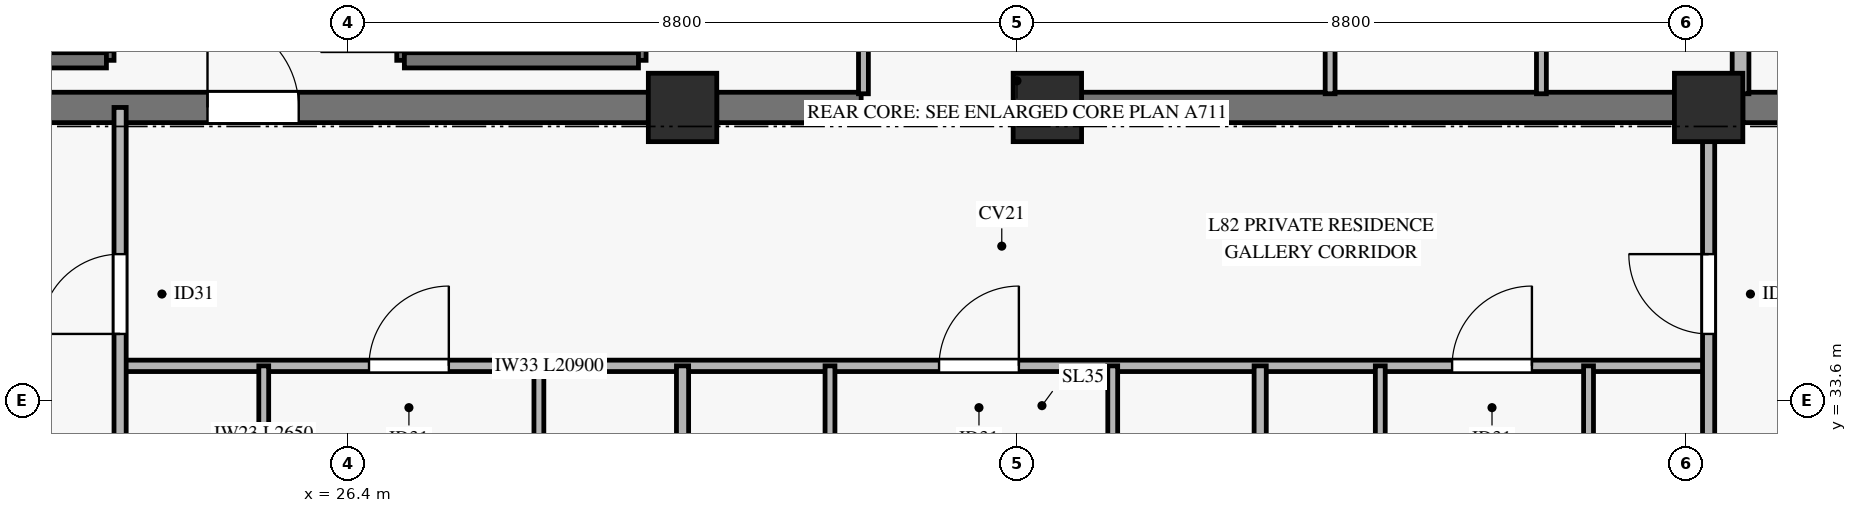
"""IFC4 building model, lengths in metres.
Left out: names, types, materials, properties, quantities, classifications, styles, units other than length and angle.
Written with IfcOpenShell. Run it as: python <this file> out.ifc"""

import sys

from ifc_helpers import new_model, si_unit, direction, frame, frame_2d, origin, origin_2d, place, context, subcontext, project, spatial, rectangle, extrude, source, transform, mapped, element, fill, save


model = new_model("IFC4")
c1 = context("Model", 3, precision=1e-05, world=origin(), true_north=direction((0.0, 1.0)))
c2 = subcontext(c1, "Body", "Model", "MODEL_VIEW")
j1 = project(units=[si_unit("LENGTHUNIT", "METRE"), si_unit("PLANEANGLEUNIT", "RADIAN")], contexts=[c1])
p1 = place(None, origin())
s1 = spatial("IfcSite", under=j1, at=p1, CompositionType="ELEMENT")
p2 = place(p1, origin())
s2 = spatial("IfcBuilding", under=s1, at=p2, CompositionType="ELEMENT")
p3 = place(p2, frame((0.0, 0.0, 317.6)))
s3 = spatial("IfcBuildingStorey", under=s2, at=p3, CompositionType="ELEMENT", Elevation=317.6)
m1 = source(origin(), c2, "Body", "SweptSolid", [
    extrude(rectangle(XDim=0.9, YDim=0.9, at=origin_2d()), origin(), (0.0, 0.0, 1.0), 3.185),
])
for number, where, z_axis, x_axis in (
    (1, (30.8, 37.45, 0.0), (0.0, 0.0, 1.0), (1.0, 0.0, 0.0)),
    (2, (35.6, 37.45, 0.0), (0.0, 0.0, 1.0), (1.0, 0.0, 0.0)),
    (3, (44.3, 37.45, 0.0), (0.0, 0.0, 1.0), (1.0, 0.0, 0.0)),
):
    element("IfcColumn", number, at=place(p3, frame(where, z_axis=z_axis, x_axis=x_axis)), inside=s3, PredefinedType="PILASTER", context=c2, shape_type="MappedRepresentation", body=[
        mapped(m1, transform((0.0, 0.0, 0.0), x_axis=(1.0, 0.0, 0.0), y_axis=(0.0, 1.0, 0.0), z_axis=(0.0, 0.0, 1.0), scale=1.0)),
    ])
p4 = place(p3, frame((20.3, 37.45, 0.0), z_axis=(0.0, 0.0, 1.0), x_axis=(1.0, 0.0, 0.0)))
e4 = element("IfcWall", 4, at=p4, inside=s3, PredefinedType="SHEAR", context=c2, shape_type="SweptSolid", body=[
    extrude(rectangle(XDim=10.05, YDim=0.4, at=frame_2d((5.025, 0.0))), origin(), (0.0, 0.0, 1.0), 3.185),
])
p5 = place(p4, frame((4.25, 0.0, 0.0)))
e5 = element("IfcOpeningElement", 5, at=p5, cuts=e4, PredefinedType="OPENING", context=c2, shape_type="SweptSolid", body=[
    extrude(rectangle(XDim=1.2, YDim=2.15, at=frame_2d((0.6, 1.075))), frame((0.0, 0.21, 0.0), z_axis=(0.0, -1.0, 0.0), x_axis=(1.0, 0.0, 0.0)), (0.0, 0.0, 1.0), 0.42),
])
p6 = place(p3, frame((31.25, 37.45, 0.0), z_axis=(0.0, 0.0, 1.0), x_axis=(1.0, 0.0, 0.0)))
e6 = element("IfcWall", 6, at=p6, inside=s3, PredefinedType="SHEAR", context=c2, shape_type="SweptSolid", body=[
    extrude(rectangle(XDim=1.9, YDim=0.4, at=frame_2d((0.95, 0.0))), origin(), (0.0, 0.0, 1.0), 3.185),
])
p7 = place(p3, frame((36.05, 37.45, 0.0), z_axis=(0.0, 0.0, 1.0), x_axis=(1.0, 0.0, 0.0)))
e7 = element("IfcWall", 7, at=p7, inside=s3, PredefinedType="SHEAR", context=c2, shape_type="SweptSolid", body=[
    extrude(rectangle(XDim=7.8, YDim=0.4, at=frame_2d((3.9, 0.0))), origin(), (0.0, 0.0, 1.0), 3.185),
])
p8 = place(p3, frame((44.75, 37.45, 0.0), z_axis=(0.0, 0.0, 1.0), x_axis=(1.0, 0.0, 0.0)))
e8 = element("IfcWall", 8, at=p8, inside=s3, PredefinedType="SHEAR", context=c2, shape_type="SweptSolid", body=[
    extrude(rectangle(XDim=5.35, YDim=0.4, at=frame_2d((2.675, 0.0))), origin(), (0.0, 0.0, 1.0), 3.185),
])
p9 = place(p8, frame((0.7, 0.0, 0.0)))
e9 = element("IfcOpeningElement", 9, at=p9, cuts=e8, PredefinedType="OPENING", context=c2, shape_type="SweptSolid", body=[
    extrude(rectangle(XDim=1.2, YDim=2.15, at=frame_2d((0.6, 1.075))), frame((0.0, 0.21, 0.0), z_axis=(0.0, -1.0, 0.0), x_axis=(1.0, 0.0, 0.0)), (0.0, 0.0, 1.0), 0.42),
])
p10 = place(p3, frame((23.22, 38.07, 0.0), z_axis=(0.0, 0.0, 1.0), x_axis=(0.0, 1.0, 0.0)))
e10 = element("IfcWall", 10, at=p10, inside=s3, PredefinedType="SOLIDWALL", context=c2, shape_type="SweptSolid", body=[
    extrude(rectangle(XDim=7.25, YDim=0.2, at=frame_2d((3.625, 0.0))), origin(), (0.0, 0.0, 1.0), 3.4),
])
p11 = place(p10, frame((0.11, 0.0, 0.0)))
e11 = element("IfcOpeningElement", 11, at=p11, cuts=e10, PredefinedType="OPENING", context=c2, shape_type="SweptSolid", body=[
    extrude(rectangle(XDim=1.1, YDim=2.15, at=frame_2d((0.55, 1.075))), frame((0.0, 0.11, 0.0), z_axis=(0.0, -1.0, 0.0), x_axis=(1.0, 0.0, 0.0)), (0.0, 0.0, 1.0), 0.22),
])
p12 = place(p3, frame((20.17, 38.07, 0.0), z_axis=(0.0, 0.0, 1.0), x_axis=(1.0, 0.0, 0.0)))
e12 = element("IfcWall", 12, at=p12, inside=s3, PredefinedType="SOLIDWALL", context=c2, shape_type="SweptSolid", body=[
    extrude(rectangle(XDim=3.05, YDim=0.2, at=frame_2d((1.525, 0.0))), origin(), (0.0, 0.0, 1.0), 3.4),
])
p13 = place(p3, frame((27.14, 38.07, 0.0), z_axis=(0.0, 0.0, 1.0), x_axis=(0.0, 1.0, 0.0)))
e13 = element("IfcWall", 13, at=p13, inside=s3, PredefinedType="SOLIDWALL", context=c2, shape_type="SweptSolid", body=[
    extrude(rectangle(XDim=7.25, YDim=0.2, at=frame_2d((3.625, 0.0))), origin(), (0.0, 0.0, 1.0), 3.4),
])
p14 = place(p13, frame((0.11, 0.0, 0.0)))
e14 = element("IfcOpeningElement", 14, at=p14, cuts=e13, PredefinedType="OPENING", context=c2, shape_type="SweptSolid", body=[
    extrude(rectangle(XDim=1.1, YDim=2.15, at=frame_2d((0.55, 1.075))), frame((0.0, 0.11, 0.0), z_axis=(0.0, -1.0, 0.0), x_axis=(1.0, 0.0, 0.0)), (0.0, 0.0, 1.0), 0.22),
])
p15 = place(p3, frame((30.22, 38.07, 0.0), z_axis=(0.0, 0.0, 1.0), x_axis=(0.0, 1.0, 0.0)))
e15 = element("IfcWall", 15, at=p15, inside=s3, PredefinedType="SOLIDWALL", context=c2, shape_type="SweptSolid", body=[
    extrude(rectangle(XDim=7.25, YDim=0.2, at=frame_2d((3.625, 0.0))), origin(), (0.0, 0.0, 1.0), 3.4),
])
p16 = place(p3, frame((27.14, 38.07, 0.0), z_axis=(0.0, 0.0, 1.0), x_axis=(1.0, 0.0, 0.0)))
e16 = element("IfcWall", 16, at=p16, inside=s3, PredefinedType="SOLIDWALL", context=c2, shape_type="SweptSolid", body=[
    extrude(rectangle(XDim=3.08, YDim=0.2, at=frame_2d((1.54, 0.0))), origin(), (0.0, 0.0, 1.0), 3.4),
])
p17 = place(p3, frame((44.72, 37.63, 0.0), z_axis=(0.0, 0.0, 1.0), x_axis=(0.0, 1.0, 0.0)))
e17 = element("IfcWall", 17, at=p17, inside=s3, PredefinedType="SOLIDWALL", context=c2, shape_type="SweptSolid", body=[
    extrude(rectangle(XDim=7.59, YDim=0.22, at=frame_2d((3.795, 0.0))), origin(), (0.0, 0.0, 1.0), 3.185),
])
p18 = place(p3, frame((33.18, 37.63, 0.0), z_axis=(0.0, 0.0, 1.0), x_axis=(0.0, 1.0, 0.0)))
e18 = element("IfcWall", 18, at=p18, inside=s3, PredefinedType="PARTITIONING", context=c2, shape_type="SweptSolid", body=[
    extrude(rectangle(XDim=6.52, YDim=0.13, at=frame_2d((3.26, 0.0))), origin(), (0.0, 0.0, 1.0), 2.27),
])
p19 = place(p18, frame((0.97, 0.0, 0.0)))
e19 = element("IfcOpeningElement", 19, at=p19, cuts=e18, PredefinedType="OPENING", context=c2, shape_type="SweptSolid", body=[
    extrude(rectangle(XDim=0.9, YDim=2.1, at=frame_2d((0.45, 1.05))), frame((0.0, 0.075, 0.0), z_axis=(0.0, -1.0, 0.0), x_axis=(1.0, 0.0, 0.0)), (0.0, 0.0, 1.0), 0.15),
])
p20 = place(p18, frame((3.87, 0.0, 0.0)))
e20 = element("IfcOpeningElement", 20, at=p20, cuts=e18, PredefinedType="OPENING", context=c2, shape_type="SweptSolid", body=[
    extrude(rectangle(XDim=0.9, YDim=2.1, at=frame_2d((0.45, 1.05))), frame((0.0, 0.075, 0.0), z_axis=(0.0, -1.0, 0.0), x_axis=(1.0, 0.0, 0.0)), (0.0, 0.0, 1.0), 0.15),
])
p21 = place(p3, frame((39.32, 37.63, 0.0), z_axis=(0.0, 0.0, 1.0), x_axis=(0.0, 1.0, 0.0)))
e21 = element("IfcWall", 21, at=p21, inside=s3, PredefinedType="PARTITIONING", context=c2, shape_type="SweptSolid", body=[
    extrude(rectangle(XDim=8.74, YDim=0.13, at=frame_2d((4.37, 0.0))), origin(), (0.0, 0.0, 1.0), 3.185),
])
p22 = place(p21, frame((4.89, 0.0, 0.0)))
e22 = element("IfcOpeningElement", 22, at=p22, cuts=e21, PredefinedType="OPENING", context=c2, shape_type="SweptSolid", body=[
    extrude(rectangle(XDim=0.9, YDim=2.1, at=frame_2d((0.45, 1.05))), frame((0.0, 0.075, 0.0), z_axis=(0.0, -1.0, 0.0), x_axis=(1.0, 0.0, 0.0)), (0.0, 0.0, 1.0), 0.15),
])
p23 = place(p3, frame((42.1, 37.63, 0.0), z_axis=(0.0, 0.0, 1.0), x_axis=(0.0, 1.0, 0.0)))
e23 = element("IfcWall", 23, at=p23, inside=s3, PredefinedType="PARTITIONING", context=c2, shape_type="SweptSolid", body=[
    extrude(rectangle(XDim=8.74, YDim=0.13, at=frame_2d((4.37, 0.0))), origin(), (0.0, 0.0, 1.0), 3.185),
])
p24 = place(p23, frame((2.17, 0.0, 0.0)))
e24 = element("IfcOpeningElement", 24, at=p24, cuts=e23, PredefinedType="OPENING", context=c2, shape_type="SweptSolid", body=[
    extrude(rectangle(XDim=0.9, YDim=2.1, at=frame_2d((0.45, 1.05))), frame((0.0, 0.075, 0.0), z_axis=(0.0, -1.0, 0.0), x_axis=(1.0, 0.0, 0.0)), (0.0, 0.0, 1.0), 0.15),
])
p25 = place(p3, frame((23.4, 34.05, 0.0), z_axis=(0.0, 0.0, 1.0), x_axis=(1.0, 0.0, 0.0)))
e25 = element("IfcWall", 25, at=p25, inside=s3, PredefinedType="PARTITIONING", context=c2, shape_type="SweptSolid", body=[
    extrude(rectangle(XDim=20.9, YDim=0.15, at=frame_2d((10.45, 0.0))), origin(), (0.0, 0.0, 1.0), 2.47),
])
p26 = place(p25, frame((3.275, 0.0, 0.0)))
e26 = element("IfcOpeningElement", 26, at=p26, cuts=e25, PredefinedType="OPENING", context=c2, shape_type="SweptSolid", body=[
    extrude(rectangle(XDim=1.05, YDim=2.15, at=frame_2d((0.525, 1.075))), frame((0.0, 0.085, 0.0), z_axis=(0.0, -1.0, 0.0), x_axis=(1.0, 0.0, 0.0)), (0.0, 0.0, 1.0), 0.17),
])
p27 = place(p25, frame((10.775, 0.0, 0.0)))
e27 = element("IfcOpeningElement", 27, at=p27, cuts=e25, PredefinedType="OPENING", context=c2, shape_type="SweptSolid", body=[
    extrude(rectangle(XDim=1.05, YDim=2.15, at=frame_2d((0.525, 1.075))), frame((0.0, 0.085, 0.0), z_axis=(0.0, -1.0, 0.0), x_axis=(1.0, 0.0, 0.0)), (0.0, 0.0, 1.0), 0.17),
])
p28 = place(p25, frame((17.525, 0.0, 0.0)))
e28 = element("IfcOpeningElement", 28, at=p28, cuts=e25, PredefinedType="OPENING", context=c2, shape_type="SweptSolid", body=[
    extrude(rectangle(XDim=1.05, YDim=2.15, at=frame_2d((0.525, 1.075))), frame((0.0, 0.085, 0.0), z_axis=(0.0, -1.0, 0.0), x_axis=(1.0, 0.0, 0.0)), (0.0, 0.0, 1.0), 0.17),
])
p29 = place(p3, frame((23.4, 20.704, 0.0), z_axis=(0.0, 0.0, 1.0), x_axis=(0.0, 1.0, 0.0)))
e29 = element("IfcWall", 29, at=p29, inside=s3, PredefinedType="PARTITIONING", context=c2, shape_type="SweptSolid", body=[
    extrude(rectangle(XDim=16.746, YDim=0.16, at=frame_2d((8.373, 0.0))), origin(), (0.0, 0.0, 1.0), 2.77),
])
p30 = place(p29, frame((13.766, 0.0, 0.0)))
e30 = element("IfcOpeningElement", 30, at=p30, cuts=e29, PredefinedType="OPENING", context=c2, shape_type="SweptSolid", body=[
    extrude(rectangle(XDim=1.05, YDim=2.15, at=frame_2d((0.525, 1.075))), frame((0.0, 0.09, 0.0), z_axis=(0.0, -1.0, 0.0), x_axis=(1.0, 0.0, 0.0)), (0.0, 0.0, 1.0), 0.18),
])
p31 = place(p3, frame((30.8, 20.704, 0.0), z_axis=(0.0, 0.0, 1.0), x_axis=(0.0, 1.0, 0.0)))
e31 = element("IfcWall", 31, at=p31, inside=s3, PredefinedType="PARTITIONING", context=c2, shape_type="SweptSolid", body=[
    extrude(rectangle(XDim=13.346, YDim=0.16, at=frame_2d((6.673, 0.0))), origin(), (0.0, 0.0, 1.0), 2.47),
])
p32 = place(p3, frame((38.4, 20.704, 0.0), z_axis=(0.0, 0.0, 1.0), x_axis=(0.0, 1.0, 0.0)))
e32 = element("IfcWall", 32, at=p32, inside=s3, PredefinedType="PARTITIONING", context=c2, shape_type="SweptSolid", body=[
    extrude(rectangle(XDim=13.346, YDim=0.16, at=frame_2d((6.673, 0.0))), origin(), (0.0, 0.0, 1.0), 2.77),
])
p33 = place(p3, frame((44.3, 20.704, 0.0), z_axis=(0.0, 0.0, 1.0), x_axis=(0.0, 1.0, 0.0)))
e33 = element("IfcWall", 33, at=p33, inside=s3, PredefinedType="PARTITIONING", context=c2, shape_type="SweptSolid", body=[
    extrude(rectangle(XDim=16.746, YDim=0.16, at=frame_2d((8.373, 0.0))), origin(), (0.0, 0.0, 1.0), 2.47),
])
p34 = place(p33, frame((13.766, 0.0, 0.0)))
e34 = element("IfcOpeningElement", 34, at=p34, cuts=e33, PredefinedType="OPENING", context=c2, shape_type="SweptSolid", body=[
    extrude(rectangle(XDim=1.05, YDim=2.15, at=frame_2d((0.525, 1.075))), frame((0.0, 0.09, 0.0), z_axis=(0.0, -1.0, 0.0), x_axis=(1.0, 0.0, 0.0)), (0.0, 0.0, 1.0), 0.18),
])
p35 = place(p3, frame((25.29, 31.4, 0.0), z_axis=(0.0, 0.0, 1.0), x_axis=(0.0, 1.0, 0.0)))
e35 = element("IfcWall", 35, at=p35, inside=s3, PredefinedType="PARTITIONING", context=c2, shape_type="SweptSolid", body=[
    extrude(rectangle(XDim=2.65, YDim=0.13, at=frame_2d((1.325, 0.0))), origin(), (0.0, 0.0, 1.0), 2.77),
])
p36 = place(p3, frame((28.91, 31.4, 0.0), z_axis=(0.0, 0.0, 1.0), x_axis=(0.0, 1.0, 0.0)))
e36 = element("IfcWall", 36, at=p36, inside=s3, PredefinedType="PARTITIONING", context=c2, shape_type="SweptSolid", body=[
    extrude(rectangle(XDim=2.65, YDim=0.13, at=frame_2d((1.325, 0.0))), origin(), (0.0, 0.0, 1.0), 2.77),
])
p37 = place(p36, frame((0.67, 0.0, 0.0)))
e37 = element("IfcOpeningElement", 37, at=p37, cuts=e36, PredefinedType="OPENING", context=c2, shape_type="SweptSolid", body=[
    extrude(rectangle(XDim=0.9, YDim=2.1, at=frame_2d((0.45, 1.05))), frame((0.0, 0.075, 0.0), z_axis=(0.0, -1.0, 0.0), x_axis=(1.0, 0.0, 0.0)), (0.0, 0.0, 1.0), 0.15),
])
p38 = place(p3, frame((32.74, 31.4, 0.0), z_axis=(0.0, 0.0, 1.0), x_axis=(0.0, 1.0, 0.0)))
e38 = element("IfcWall", 38, at=p38, inside=s3, PredefinedType="PARTITIONING", context=c2, shape_type="SweptSolid", body=[
    extrude(rectangle(XDim=2.65, YDim=0.13, at=frame_2d((1.325, 0.0))), origin(), (0.0, 0.0, 1.0), 2.77),
])
p39 = place(p3, frame((36.46, 31.4, 0.0), z_axis=(0.0, 0.0, 1.0), x_axis=(0.0, 1.0, 0.0)))
e39 = element("IfcWall", 39, at=p39, inside=s3, PredefinedType="PARTITIONING", context=c2, shape_type="SweptSolid", body=[
    extrude(rectangle(XDim=2.65, YDim=0.13, at=frame_2d((1.325, 0.0))), origin(), (0.0, 0.0, 1.0), 2.77),
])
p40 = place(p39, frame((0.67, 0.0, 0.0)))
e40 = element("IfcOpeningElement", 40, at=p40, cuts=e39, PredefinedType="OPENING", context=c2, shape_type="SweptSolid", body=[
    extrude(rectangle(XDim=0.9, YDim=2.1, at=frame_2d((0.45, 1.05))), frame((0.0, 0.075, 0.0), z_axis=(0.0, -1.0, 0.0), x_axis=(1.0, 0.0, 0.0)), (0.0, 0.0, 1.0), 0.15),
])
p41 = place(p3, frame((39.98, 31.4, 0.0), z_axis=(0.0, 0.0, 1.0), x_axis=(0.0, 1.0, 0.0)))
e41 = element("IfcWall", 41, at=p41, inside=s3, PredefinedType="PARTITIONING", context=c2, shape_type="SweptSolid", body=[
    extrude(rectangle(XDim=2.65, YDim=0.13, at=frame_2d((1.325, 0.0))), origin(), (0.0, 0.0, 1.0), 2.77),
])
p42 = place(p3, frame((42.72, 31.4, 0.0), z_axis=(0.0, 0.0, 1.0), x_axis=(0.0, 1.0, 0.0)))
e42 = element("IfcWall", 42, at=p42, inside=s3, PredefinedType="PARTITIONING", context=c2, shape_type="SweptSolid", body=[
    extrude(rectangle(XDim=2.65, YDim=0.13, at=frame_2d((1.325, 0.0))), origin(), (0.0, 0.0, 1.0), 2.77),
])
p43 = place(p42, frame((0.67, 0.0, 0.0)))
e43 = element("IfcOpeningElement", 43, at=p43, cuts=e42, PredefinedType="OPENING", context=c2, shape_type="SweptSolid", body=[
    extrude(rectangle(XDim=0.9, YDim=2.1, at=frame_2d((0.45, 1.05))), frame((0.0, 0.075, 0.0), z_axis=(0.0, -1.0, 0.0), x_axis=(1.0, 0.0, 0.0)), (0.0, 0.0, 1.0), 0.15),
])
m2 = source(origin(), c2, "Body", "SweptSolid", [
    extrude(rectangle(XDim=1.2, YDim=2.15, at=frame_2d((0.6, 1.075))), frame((0.0, 0.025, 0.0), z_axis=(0.0, -1.0, 0.0), x_axis=(1.0, 0.0, 0.0)), (0.0, 0.0, 1.0), 0.05),
])
p44 = place(p5, origin())
e44 = element("IfcDoor", 44, at=p44, inside=s3, OperationType="SINGLE_SWING_LEFT", PredefinedType="DOOR", context=c2, shape_type="MappedRepresentation", body=[
    mapped(m2, transform((0.0, 0.0, 0.0), x_axis=(1.0, 0.0, 0.0), y_axis=(0.0, 1.0, 0.0), z_axis=(0.0, 0.0, 1.0), scale=1.0)),
])
fill(e5, e44)
m3 = source(origin(), c2, "Body", "SweptSolid", [
    extrude(rectangle(XDim=1.05, YDim=2.15, at=frame_2d((0.525, 1.075))), frame((0.0, 0.025, 0.0), z_axis=(0.0, -1.0, 0.0), x_axis=(1.0, 0.0, 0.0)), (0.0, 0.0, 1.0), 0.05),
])
p45 = place(p30, origin())
e45 = element("IfcDoor", 45, at=p45, inside=s3, OperationType="SINGLE_SWING_LEFT", PredefinedType="DOOR", context=c2, shape_type="MappedRepresentation", body=[
    mapped(m3, transform((0.0, 0.0, 0.0), x_axis=(1.0, 0.0, 0.0), y_axis=(0.0, 1.0, 0.0), z_axis=(0.0, 0.0, 1.0), scale=1.0)),
])
fill(e30, e45)
p46 = place(p26, origin())
e46 = element("IfcDoor", 46, at=p46, inside=s3, OperationType="SINGLE_SWING_RIGHT", PredefinedType="DOOR", context=c2, shape_type="MappedRepresentation", body=[
    mapped(m3, transform((0.0, 0.0, 0.0), x_axis=(1.0, 0.0, 0.0), y_axis=(0.0, 1.0, 0.0), z_axis=(0.0, 0.0, 1.0), scale=1.0)),
])
fill(e26, e46)
p47 = place(p27, origin())
e47 = element("IfcDoor", 47, at=p47, inside=s3, OperationType="SINGLE_SWING_RIGHT", PredefinedType="DOOR", context=c2, shape_type="MappedRepresentation", body=[
    mapped(m3, transform((0.0, 0.0, 0.0), x_axis=(1.0, 0.0, 0.0), y_axis=(0.0, 1.0, 0.0), z_axis=(0.0, 0.0, 1.0), scale=1.0)),
])
fill(e27, e47)
p48 = place(p28, origin())
e48 = element("IfcDoor", 48, at=p48, inside=s3, OperationType="SINGLE_SWING_RIGHT", PredefinedType="DOOR", context=c2, shape_type="MappedRepresentation", body=[
    mapped(m3, transform((0.0, 0.0, 0.0), x_axis=(1.0, 0.0, 0.0), y_axis=(0.0, 1.0, 0.0), z_axis=(0.0, 0.0, 1.0), scale=1.0)),
])
fill(e28, e48)
p49 = place(p34, origin())
e49 = element("IfcDoor", 49, at=p49, inside=s3, OperationType="SINGLE_SWING_RIGHT", PredefinedType="DOOR", context=c2, shape_type="MappedRepresentation", body=[
    mapped(m3, transform((0.0, 0.0, 0.0), x_axis=(1.0, 0.0, 0.0), y_axis=(0.0, 1.0, 0.0), z_axis=(0.0, 0.0, 1.0), scale=1.0)),
])
fill(e34, e49)
save(model, sys.argv[1])
